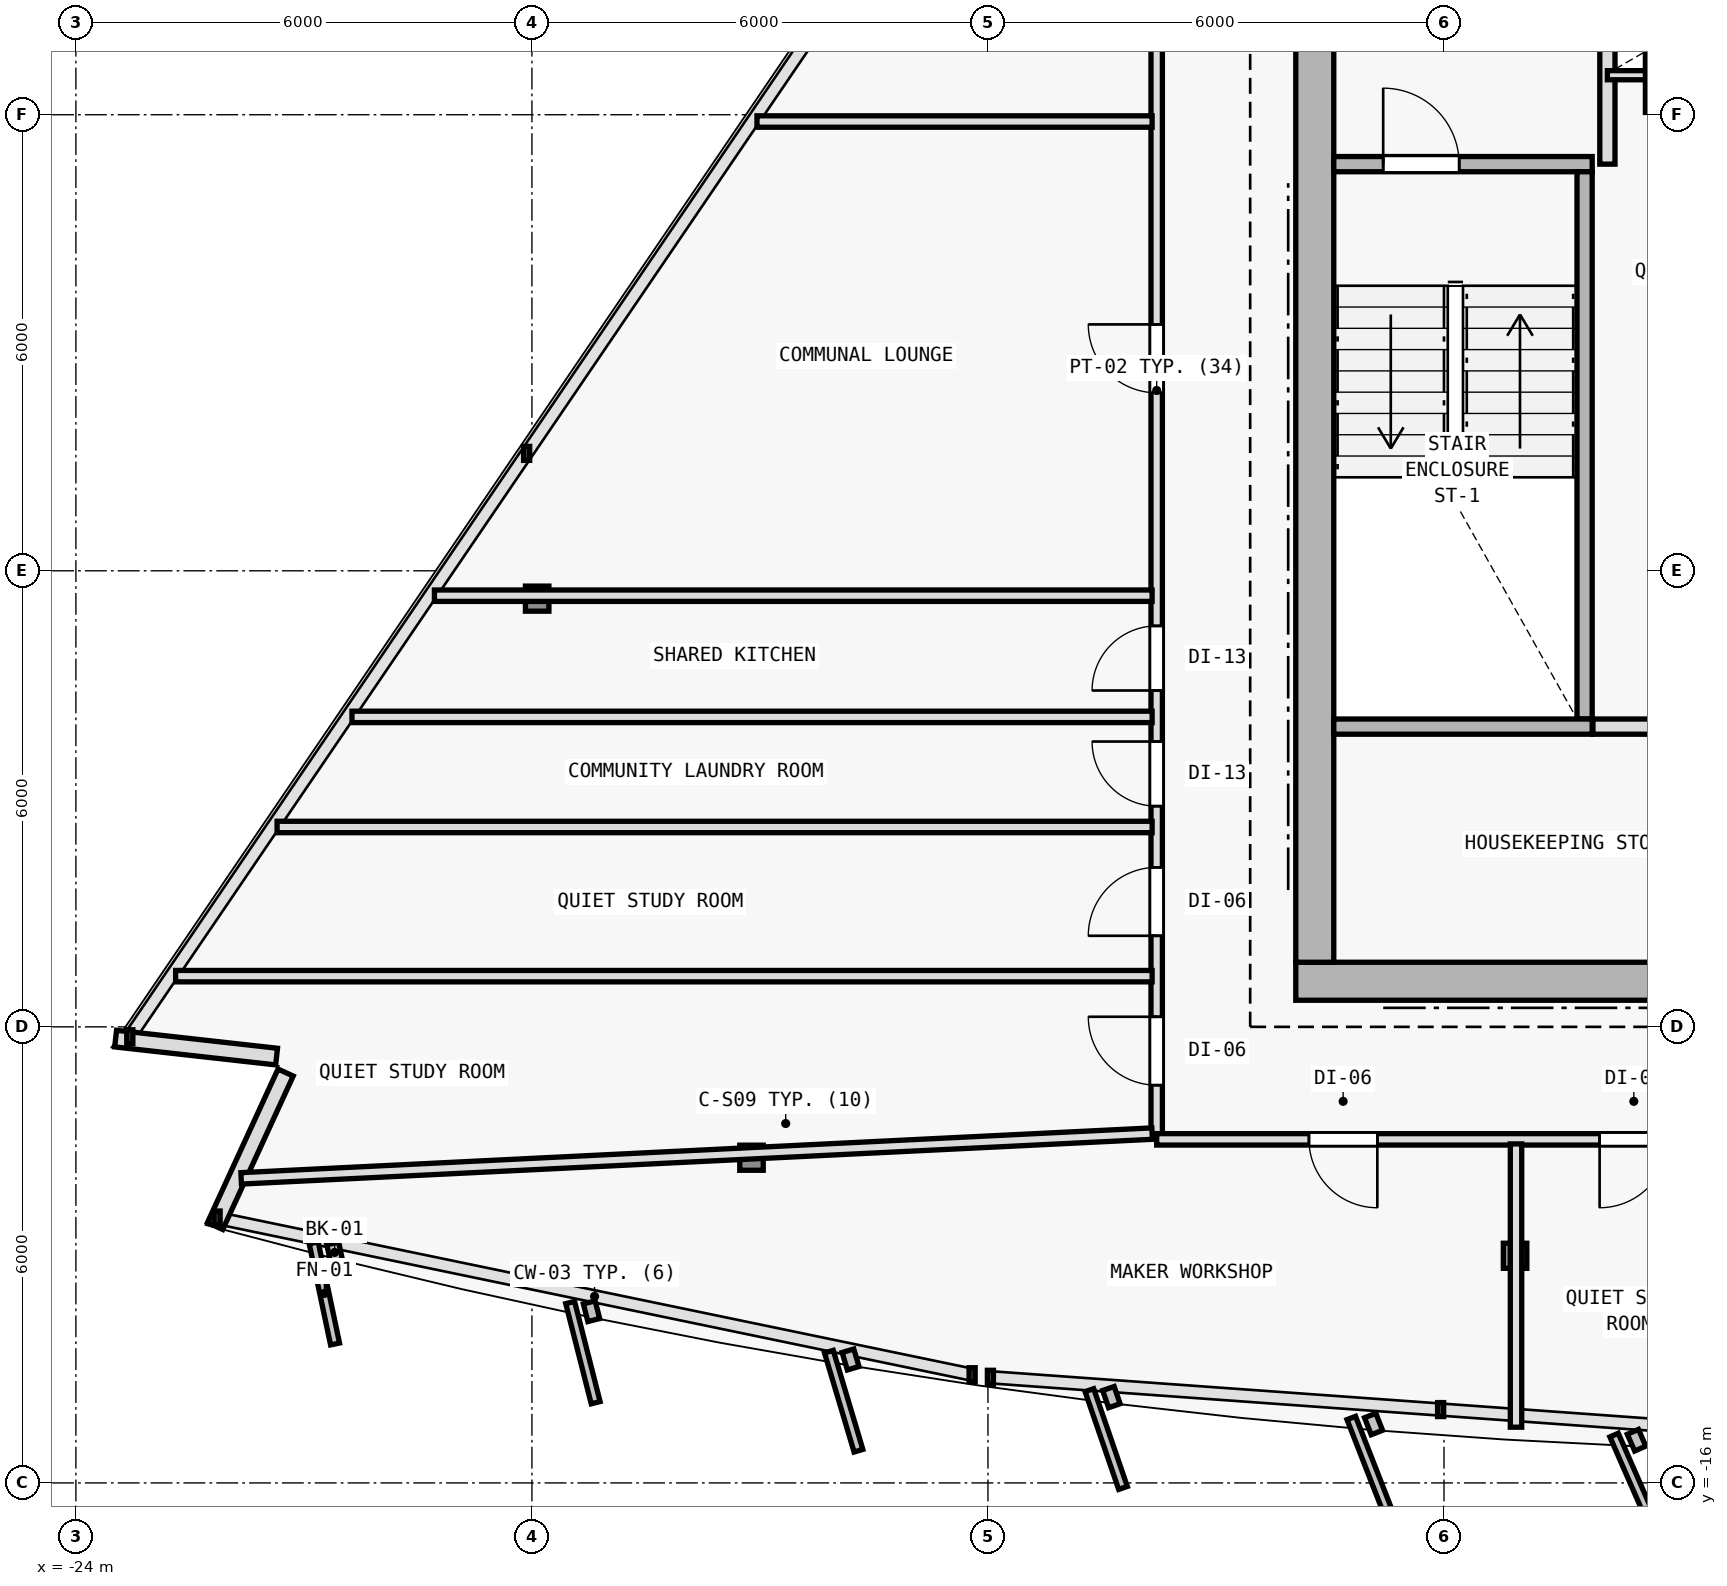
"""IFC4 building model, lengths in metres.
Left out: names, types, materials, properties, quantities, classifications, styles, units other than length and angle.
Written with IfcOpenShell. Run it as: python <this file> out.ifc"""

import sys

from ifc_helpers import new_model, si_unit, direction, frame, frame_2d, origin, origin_2d, place, context, subcontext, project, spatial, rectangle, i_section, extrude, element, fill, save


model = new_model("IFC4")
c1 = context("Model", 3, precision=1e-05, world=origin(), true_north=direction((0.0, 1.0)))
c2 = subcontext(c1, "Body", "Model", "MODEL_VIEW")
j1 = project(units=[si_unit("LENGTHUNIT", "METRE"), si_unit("PLANEANGLEUNIT", "RADIAN")], contexts=[c1])
p1 = place(None, origin())
s1 = spatial("IfcSite", under=j1, at=p1, CompositionType="ELEMENT")
p2 = place(p1, origin())
s2 = spatial("IfcBuilding", under=s1, at=p2, CompositionType="ELEMENT")
p3 = place(p2, frame((0.0, 0.0, 290.4)))
s3 = spatial("IfcBuildingStorey", under=s2, at=p3, CompositionType="ELEMENT", Elevation=290.4)
for number, where, z_axis, x_axis in (
    (1, (-7.7, -9.4, 0.0), (0.0, 0.0, 1.0), (1.0, 0.0, 0.0)),
    (2, (-7.7, 2.0, 0.0), (0.0, 0.0, 1.0), (1.0, 0.0, 0.0)),
):
    element("IfcColumn", number, at=place(p3, frame(where, z_axis=z_axis, x_axis=x_axis)), inside=s3, PredefinedType="COLUMN", context=c2, shape_type="SweptSolid", body=[
        extrude(i_section(OverallWidth=0.374, OverallDepth=0.372, WebThickness=0.012, FlangeThickness=0.02, FilletRadius=0.015, at=origin_2d()), origin(), (0.0, 0.0, 1.0), 3.6),
    ])
p4 = place(p3, frame((-15.111, -11.722, 0.006), z_axis=(0.020596339702, 0.033443561496, 0.99922836178), x_axis=(-0.851480003019, 0.52438707503, 0.0)))
e3 = element("IfcColumn", 3, at=p4, inside=s3, PredefinedType="COLUMN", context=c2, shape_type="SweptSolid", body=[
    extrude(i_section(OverallWidth=0.309, OverallDepth=0.33, WebThickness=0.011, FlangeThickness=0.019, FilletRadius=0.027, at=origin_2d()), origin(), (0.0, 0.0, 1.0), 3.592),
])
p5 = place(p3, frame((-5.065, -13.012, 0.006), z_axis=(0.006934288159, 0.035283289748, 0.999353293441), x_axis=(-0.981229659911, 0.192842823335, 0.0)))
e4 = element("IfcColumn", 4, at=p5, inside=s3, PredefinedType="COLUMN", context=c2, shape_type="SweptSolid", body=[
    extrude(i_section(OverallWidth=0.309, OverallDepth=0.33, WebThickness=0.011, FlangeThickness=0.019, FilletRadius=0.027, at=origin_2d()), origin(), (0.0, 0.0, 1.0), 3.591),
])
p6 = place(p3, frame((-17.931, -4.366, 0.006), z_axis=(0.025224163578, 0.021620711639, 0.999447990843), x_axis=(-0.650791373456, 0.759256602365, 0.0)))
e5 = element("IfcColumn", 5, at=p6, inside=s3, PredefinedType="COLUMN", context=c2, shape_type="SweptSolid", body=[
    extrude(i_section(OverallWidth=0.309, OverallDepth=0.33, WebThickness=0.011, FlangeThickness=0.019, FilletRadius=0.027, at=origin_2d()), origin(), (0.0, 0.0, 1.0), 3.591),
])
p7 = place(p3, frame((-21.36, -10.391, 0.0), z_axis=(0.0, 0.0, 1.0), x_axis=(-0.993817888275, 0.111022542511, 0.0)))
e6 = element("IfcWall", 6, at=p7, inside=s3, PredefinedType="SOLIDWALL", context=c2, shape_type="SweptSolid", body=[
    extrude(rectangle(XDim=2.131, YDim=0.22, at=frame_2d((1.065, 0.0))), origin(), (0.0, 0.0, 1.0), 3.15),
])
p8 = place(p3, frame((-22.168, -12.62, 0.0), z_axis=(0.0, 0.0, 1.0), x_axis=(0.417426589535, 0.908710648308, 0.0)))
e7 = element("IfcWall", 7, at=p8, inside=s3, PredefinedType="SOLIDWALL", context=c2, shape_type="SweptSolid", body=[
    extrude(rectangle(XDim=2.221, YDim=0.22, at=frame_2d((1.111, 0.0))), origin(), (0.0, 0.0, 1.0), 3.15),
])
p9 = place(p3, frame((-7.95, -9.4, 0.0), z_axis=(0.0, 0.0, 1.0), x_axis=(1.0, 0.0, 0.0)))
e8 = element("IfcWall", 8, at=p9, inside=s3, PredefinedType="SHEAR", context=c2, shape_type="SweptSolid", body=[
    extrude(rectangle(XDim=15.9, YDim=0.5, at=frame_2d((7.95, 0.0))), origin(), (0.0, 0.0, 1.0), 3.15),
])
p10 = place(p9, frame((9.6, 0.0, 0.0)))
e9 = element("IfcOpeningElement", 9, at=p10, cuts=e8, PredefinedType="OPENING", context=c2, shape_type="SweptSolid", body=[
    extrude(rectangle(XDim=1.5, YDim=2.2, at=frame_2d((0.75, 1.1))), frame((0.0, 0.26, 0.0), z_axis=(0.0, -1.0, 0.0), x_axis=(1.0, 0.0, 0.0)), (0.0, 0.0, 1.0), 0.52),
])
p11 = place(p3, frame((-7.7, -9.15, 0.0), z_axis=(0.0, 0.0, 1.0), x_axis=(0.0, 1.0, 0.0)))
e10 = element("IfcWall", 10, at=p11, inside=s3, PredefinedType="SHEAR", context=c2, shape_type="SweptSolid", body=[
    extrude(rectangle(XDim=19.1, YDim=0.5, at=frame_2d((9.55, 0.0))), origin(), (0.0, 0.0, 1.0), 3.15),
])
p12 = place(p11, frame((12.7, 0.0, 0.0)))
e11 = element("IfcOpeningElement", 11, at=p12, cuts=e10, PredefinedType="OPENING", context=c2, shape_type="SweptSolid", body=[
    extrude(rectangle(XDim=1.1, YDim=2.15, at=frame_2d((0.55, 1.075))), frame((0.0, 0.26, 0.0), z_axis=(0.0, -1.0, 0.0), x_axis=(1.0, 0.0, 0.0)), (0.0, 0.0, 1.0), 0.52),
])
p13 = place(p3, frame((-7.45, 1.35, 0.0), z_axis=(0.0, 0.0, 1.0), x_axis=(1.0, 0.0, 0.0)))
e12 = element("IfcWall", 12, at=p13, inside=s3, PredefinedType="SOLIDWALL", context=c2, shape_type="SweptSolid", body=[
    extrude(rectangle(XDim=3.4, YDim=0.2, at=frame_2d((1.7, 0.0))), origin(), (0.0, 0.0, 1.0), 3.15),
])
p14 = place(p13, frame((0.65, 0.0, 0.0)))
e13 = element("IfcOpeningElement", 13, at=p14, cuts=e12, PredefinedType="OPENING", context=c2, shape_type="SweptSolid", body=[
    extrude(rectangle(XDim=1.0, YDim=2.15, at=frame_2d((0.5, 1.075))), frame((0.0, 0.11, 0.0), z_axis=(0.0, -1.0, 0.0), x_axis=(1.0, 0.0, 0.0)), (0.0, 0.0, 1.0), 0.22),
])
p15 = place(p3, frame((-4.15, -5.95, 0.0), z_axis=(0.0, 0.0, 1.0), x_axis=(0.0, 1.0, 0.0)))
e14 = element("IfcWall", 14, at=p15, inside=s3, PredefinedType="SOLIDWALL", context=c2, shape_type="SweptSolid", body=[
    extrude(rectangle(XDim=7.2, YDim=0.2, at=frame_2d((3.6, 0.0))), origin(), (0.0, 0.0, 1.0), 3.15),
])
p16 = place(p3, frame((-3.85, 1.35, 0.0), z_axis=(0.0, 0.0, 1.0), x_axis=(0.0, 1.0, 0.0)))
e15 = element("IfcWall", 15, at=p16, inside=s3, PredefinedType="SOLIDWALL", context=c2, shape_type="SweptSolid", body=[
    extrude(rectangle(XDim=8.595, YDim=0.2, at=frame_2d((4.297, 0.0))), origin(), (0.0, 0.0, 1.0), 3.15),
])
p17 = place(p16, frame((1.5, 0.0, 0.0)))
e16 = element("IfcOpeningElement", 16, at=p17, cuts=e15, PredefinedType="OPENING", context=c2, shape_type="SweptSolid", body=[
    extrude(rectangle(XDim=1.0, YDim=2.15, at=frame_2d((0.5, 1.075))), frame((0.0, 0.11, 0.0), z_axis=(0.0, -1.0, 0.0), x_axis=(1.0, 0.0, 0.0)), (0.0, 0.0, 1.0), 0.22),
])
p18 = place(p16, frame((3.18, 0.0, 0.0)))
e17 = element("IfcOpeningElement", 17, at=p18, cuts=e15, PredefinedType="OPENING", context=c2, shape_type="SweptSolid", body=[
    extrude(rectangle(XDim=1.0, YDim=2.15, at=frame_2d((0.5, 1.075))), frame((0.0, 0.11, 0.0), z_axis=(0.0, -1.0, 0.0), x_axis=(1.0, 0.0, 0.0)), (0.0, 0.0, 1.0), 0.22),
])
p19 = place(p3, frame((-3.85, 2.52, 0.0), z_axis=(0.0, 0.0, 1.0), x_axis=(1.0, 0.0, 0.0)))
e18 = element("IfcWall", 18, at=p19, inside=s3, PredefinedType="PARTITIONING", context=c2, shape_type="SweptSolid", body=[
    extrude(rectangle(XDim=2.9, YDim=0.12, at=frame_2d((1.45, 0.0))), origin(), (0.0, 0.0, 1.0), 3.15),
])
p20 = place(p3, frame((-7.45, -6.05, 0.0), z_axis=(0.0, 0.0, 1.0), x_axis=(1.0, 0.0, 0.0)))
e19 = element("IfcWall", 19, at=p20, inside=s3, PredefinedType="SOLIDWALL", context=c2, shape_type="SweptSolid", body=[
    extrude(rectangle(XDim=3.4, YDim=0.2, at=frame_2d((1.7, 0.0))), origin(), (0.0, 0.0, 1.0), 3.15),
])
p21 = place(p3, frame((-4.04, -6.05, 0.0), z_axis=(0.0, 0.0, 1.0), x_axis=(1.0, 0.0, 0.0)))
e20 = element("IfcWall", 20, at=p21, inside=s3, PredefinedType="SOLIDWALL", context=c2, shape_type="SweptSolid", body=[
    extrude(rectangle(XDim=2.79, YDim=0.2, at=frame_2d((1.395, 0.0))), origin(), (0.0, 0.0, 1.0), 3.15),
])
p22 = place(p3, frame((-9.78, -11.48, 0.0), z_axis=(0.0, 0.0, 1.0), x_axis=(0.0, 1.0, 0.0)))
e21 = element("IfcWall", 21, at=p22, inside=s3, PredefinedType="PARTITIONING", context=c2, shape_type="SweptSolid", body=[
    extrude(rectangle(XDim=19.706, YDim=0.15, at=frame_2d((9.853, 0.0))), origin(), (0.0, 0.0, 1.0), 2.675),
])
p23 = place(p22, frame((9.822, 0.0, 0.0)))
e22 = element("IfcOpeningElement", 22, at=p23, cuts=e21, PredefinedType="OPENING", context=c2, shape_type="SweptSolid", body=[
    extrude(rectangle(XDim=0.9, YDim=2.1, at=frame_2d((0.45, 1.05))), frame((0.0, 0.085, 0.0), z_axis=(0.0, -1.0, 0.0), x_axis=(1.0, 0.0, 0.0)), (0.0, 0.0, 1.0), 0.17),
])
p24 = place(p22, frame((5.905, 0.0, 0.0)))
e23 = element("IfcOpeningElement", 23, at=p24, cuts=e21, PredefinedType="OPENING", context=c2, shape_type="SweptSolid", body=[
    extrude(rectangle(XDim=0.85, YDim=2.1, at=frame_2d((0.425, 1.05))), frame((0.0, 0.085, 0.0), z_axis=(0.0, -1.0, 0.0), x_axis=(1.0, 0.0, 0.0)), (0.0, 0.0, 1.0), 0.17),
])
p25 = place(p22, frame((4.384, 0.0, 0.0)))
e24 = element("IfcOpeningElement", 24, at=p25, cuts=e21, PredefinedType="OPENING", context=c2, shape_type="SweptSolid", body=[
    extrude(rectangle(XDim=0.85, YDim=2.1, at=frame_2d((0.425, 1.05))), frame((0.0, 0.085, 0.0), z_axis=(0.0, -1.0, 0.0), x_axis=(1.0, 0.0, 0.0)), (0.0, 0.0, 1.0), 0.17),
])
p26 = place(p22, frame((2.678, 0.0, 0.0)))
e25 = element("IfcOpeningElement", 25, at=p26, cuts=e21, PredefinedType="OPENING", context=c2, shape_type="SweptSolid", body=[
    extrude(rectangle(XDim=0.9, YDim=2.1, at=frame_2d((0.45, 1.05))), frame((0.0, 0.085, 0.0), z_axis=(0.0, -1.0, 0.0), x_axis=(1.0, 0.0, 0.0)), (0.0, 0.0, 1.0), 0.17),
])
p27 = place(p22, frame((0.713, 0.0, 0.0)))
e26 = element("IfcOpeningElement", 26, at=p27, cuts=e21, PredefinedType="OPENING", context=c2, shape_type="SweptSolid", body=[
    extrude(rectangle(XDim=0.9, YDim=2.1, at=frame_2d((0.45, 1.05))), frame((0.0, 0.085, 0.0), z_axis=(0.0, -1.0, 0.0), x_axis=(1.0, 0.0, 0.0)), (0.0, 0.0, 1.0), 0.17),
])
p28 = place(p22, frame((16.009, 0.0, 0.0)))
e27 = element("IfcOpeningElement", 27, at=p28, cuts=e21, PredefinedType="OPENING", context=c2, shape_type="SweptSolid", body=[
    extrude(rectangle(XDim=0.9, YDim=2.1, at=frame_2d((0.45, 1.05))), frame((0.0, 0.085, 0.0), z_axis=(0.0, -1.0, 0.0), x_axis=(1.0, 0.0, 0.0)), (0.0, 0.0, 1.0), 0.17),
])
p29 = place(p3, frame((9.78, -11.48, 0.0), z_axis=(0.0, 0.0, 1.0), x_axis=(-1.0, 0.0, 0.0)))
e28 = element("IfcWall", 28, at=p29, inside=s3, PredefinedType="PARTITIONING", context=c2, shape_type="SweptSolid", body=[
    extrude(rectangle(XDim=19.56, YDim=0.15, at=frame_2d((9.78, 0.0))), origin(), (0.0, 0.0, 1.0), 2.525),
])
p30 = place(p29, frame((16.657, 0.0, 0.0)))
e29 = element("IfcOpeningElement", 29, at=p30, cuts=e28, PredefinedType="OPENING", context=c2, shape_type="SweptSolid", body=[
    extrude(rectangle(XDim=0.9, YDim=2.1, at=frame_2d((0.45, 1.05))), frame((0.0, 0.085, 0.0), z_axis=(0.0, -1.0, 0.0), x_axis=(1.0, 0.0, 0.0)), (0.0, 0.0, 1.0), 0.17),
])
p31 = place(p29, frame((12.832, 0.0, 0.0)))
e30 = element("IfcOpeningElement", 30, at=p31, cuts=e28, PredefinedType="OPENING", context=c2, shape_type="SweptSolid", body=[
    extrude(rectangle(XDim=0.9, YDim=2.1, at=frame_2d((0.45, 1.05))), frame((0.0, 0.085, 0.0), z_axis=(0.0, -1.0, 0.0), x_axis=(1.0, 0.0, 0.0)), (0.0, 0.0, 1.0), 0.17),
])
p32 = place(p29, frame((10.225, 0.0, 0.0)))
e31 = element("IfcOpeningElement", 31, at=p32, cuts=e28, PredefinedType="OPENING", context=c2, shape_type="SweptSolid", body=[
    extrude(rectangle(XDim=0.9, YDim=2.1, at=frame_2d((0.45, 1.05))), frame((0.0, 0.085, 0.0), z_axis=(0.0, -1.0, 0.0), x_axis=(1.0, 0.0, 0.0)), (0.0, 0.0, 1.0), 0.17),
])
p33 = place(p29, frame((7.864, 0.0, 0.0)))
e32 = element("IfcOpeningElement", 32, at=p33, cuts=e28, PredefinedType="OPENING", context=c2, shape_type="SweptSolid", body=[
    extrude(rectangle(XDim=0.9, YDim=2.1, at=frame_2d((0.45, 1.05))), frame((0.0, 0.085, 0.0), z_axis=(0.0, -1.0, 0.0), x_axis=(1.0, 0.0, 0.0)), (0.0, 0.0, 1.0), 0.17),
])
p34 = place(p29, frame((5.419, 0.0, 0.0)))
e33 = element("IfcOpeningElement", 33, at=p34, cuts=e28, PredefinedType="OPENING", context=c2, shape_type="SweptSolid", body=[
    extrude(rectangle(XDim=0.9, YDim=2.1, at=frame_2d((0.45, 1.05))), frame((0.0, 0.085, 0.0), z_axis=(0.0, -1.0, 0.0), x_axis=(1.0, 0.0, 0.0)), (0.0, 0.0, 1.0), 0.17),
])
p35 = place(p3, frame((-9.84, -11.404, 0.0), z_axis=(0.0, 0.0, 1.0), x_axis=(-0.99879424389, -0.049092345355, 0.0)))
e34 = element("IfcWall", 34, at=p35, inside=s3, PredefinedType="PARTITIONING", context=c2, shape_type="SweptSolid", body=[
    extrude(rectangle(XDim=12.0, YDim=0.15, at=frame_2d((6.0, 0.0))), origin(), (0.0, 0.0, 1.0), 2.815),
])
p36 = place(p3, frame((-5.052, -11.54, 0.0), z_axis=(0.0, 0.0, 1.0), x_axis=(0.0, -1.0, 0.0)))
e35 = element("IfcWall", 35, at=p36, inside=s3, PredefinedType="PARTITIONING", context=c2, shape_type="SweptSolid", body=[
    extrude(rectangle(XDim=3.727, YDim=0.15, at=frame_2d((1.863, 0.0))), origin(), (0.0, 0.0, 1.0), 2.795),
])
p37 = place(p3, frame((-9.84, -4.328, 0.0), z_axis=(0.0, 0.0, 1.0), x_axis=(-1.0, 0.0, 0.0)))
e36 = element("IfcWall", 36, at=p37, inside=s3, PredefinedType="PARTITIONING", context=c2, shape_type="SweptSolid", body=[
    extrude(rectangle(XDim=9.443, YDim=0.15, at=frame_2d((4.721, 0.0))), origin(), (0.0, 0.0, 1.0), 2.675),
])
p38 = place(p3, frame((-9.84, -7.371, 0.0), z_axis=(0.0, 0.0, 1.0), x_axis=(-1.0, 0.0, 0.0)))
e37 = element("IfcWall", 37, at=p38, inside=s3, PredefinedType="PARTITIONING", context=c2, shape_type="SweptSolid", body=[
    extrude(rectangle(XDim=11.513, YDim=0.15, at=frame_2d((5.756, 0.0))), origin(), (0.0, 0.0, 1.0), 2.675),
])
p39 = place(p3, frame((-9.84, -5.922, 0.0), z_axis=(0.0, 0.0, 1.0), x_axis=(-1.0, 0.0, 0.0)))
e38 = element("IfcWall", 38, at=p39, inside=s3, PredefinedType="PARTITIONING", context=c2, shape_type="SweptSolid", body=[
    extrude(rectangle(XDim=10.528, YDim=0.15, at=frame_2d((5.264, 0.0))), origin(), (0.0, 0.0, 1.0), 2.675),
])
p40 = place(p3, frame((-9.84, -9.333, 0.0), z_axis=(0.0, 0.0, 1.0), x_axis=(-1.0, 0.0, 0.0)))
e39 = element("IfcWall", 39, at=p40, inside=s3, PredefinedType="PARTITIONING", context=c2, shape_type="SweptSolid", body=[
    extrude(rectangle(XDim=12.848, YDim=0.15, at=frame_2d((6.424, 0.0))), origin(), (0.0, 0.0, 1.0), 2.815),
])
p41 = place(p3, frame((-9.84, 1.911, 0.0), z_axis=(0.0, 0.0, 1.0), x_axis=(-1.0, 0.0, 0.0)))
e40 = element("IfcWall", 40, at=p41, inside=s3, PredefinedType="PARTITIONING", context=c2, shape_type="SweptSolid", body=[
    extrude(rectangle(XDim=5.199, YDim=0.15, at=frame_2d((2.6, 0.0))), origin(), (0.0, 0.0, 1.0), 2.795),
])
p42 = place(p14, origin())
e41 = element("IfcDoor", 41, at=p42, inside=s3, OperationType="SINGLE_SWING_LEFT", PredefinedType="DOOR", context=c2, shape_type="SweptSolid", body=[
    extrude(rectangle(XDim=1.0, YDim=2.15, at=frame_2d((0.5, 1.075))), frame((0.0, 0.025, 0.0), z_axis=(0.0, -1.0, 0.0), x_axis=(1.0, 0.0, 0.0)), (0.0, 0.0, 1.0), 0.05),
])
fill(e13, e41)
p43 = place(p23, origin())
e42 = element("IfcDoor", 42, at=p43, inside=s3, OperationType="SINGLE_SWING_RIGHT", PredefinedType="DOOR", context=c2, shape_type="SweptSolid", body=[
    extrude(rectangle(XDim=0.9, YDim=2.1, at=frame_2d((0.45, 1.05))), frame((0.0, 0.025, 0.0), z_axis=(0.0, -1.0, 0.0), x_axis=(1.0, 0.0, 0.0)), (0.0, 0.0, 1.0), 0.05),
])
fill(e22, e42)
p44 = place(p24, origin())
e43 = element("IfcDoor", 43, at=p44, inside=s3, OperationType="SINGLE_SWING_LEFT", PredefinedType="DOOR", context=c2, shape_type="SweptSolid", body=[
    extrude(rectangle(XDim=0.85, YDim=2.1, at=frame_2d((0.425, 1.05))), frame((0.0, 0.025, 0.0), z_axis=(0.0, -1.0, 0.0), x_axis=(1.0, 0.0, 0.0)), (0.0, 0.0, 1.0), 0.05),
])
fill(e23, e43)
p45 = place(p25, origin())
e44 = element("IfcDoor", 44, at=p45, inside=s3, OperationType="SINGLE_SWING_RIGHT", PredefinedType="DOOR", context=c2, shape_type="SweptSolid", body=[
    extrude(rectangle(XDim=0.85, YDim=2.1, at=frame_2d((0.425, 1.05))), frame((0.0, 0.025, 0.0), z_axis=(0.0, -1.0, 0.0), x_axis=(1.0, 0.0, 0.0)), (0.0, 0.0, 1.0), 0.05),
])
fill(e24, e44)
p46 = place(p26, origin())
e45 = element("IfcDoor", 45, at=p46, inside=s3, OperationType="SINGLE_SWING_LEFT", PredefinedType="DOOR", context=c2, shape_type="SweptSolid", body=[
    extrude(rectangle(XDim=0.9, YDim=2.1, at=frame_2d((0.45, 1.05))), frame((0.0, 0.025, 0.0), z_axis=(0.0, -1.0, 0.0), x_axis=(1.0, 0.0, 0.0)), (0.0, 0.0, 1.0), 0.05),
])
fill(e25, e45)
p47 = place(p27, origin())
e46 = element("IfcDoor", 46, at=p47, inside=s3, OperationType="SINGLE_SWING_RIGHT", PredefinedType="DOOR", context=c2, shape_type="SweptSolid", body=[
    extrude(rectangle(XDim=0.9, YDim=2.1, at=frame_2d((0.45, 1.05))), frame((0.0, 0.025, 0.0), z_axis=(0.0, -1.0, 0.0), x_axis=(1.0, 0.0, 0.0)), (0.0, 0.0, 1.0), 0.05),
])
fill(e26, e46)
p48 = place(p30, origin())
e47 = element("IfcDoor", 47, at=p48, inside=s3, OperationType="SINGLE_SWING_LEFT", PredefinedType="DOOR", context=c2, shape_type="SweptSolid", body=[
    extrude(rectangle(XDim=0.9, YDim=2.1, at=frame_2d((0.45, 1.05))), frame((0.0, 0.025, 0.0), z_axis=(0.0, -1.0, 0.0), x_axis=(1.0, 0.0, 0.0)), (0.0, 0.0, 1.0), 0.05),
])
fill(e29, e47)
p49 = place(p31, origin())
e48 = element("IfcDoor", 48, at=p49, inside=s3, OperationType="SINGLE_SWING_RIGHT", PredefinedType="DOOR", context=c2, shape_type="SweptSolid", body=[
    extrude(rectangle(XDim=0.9, YDim=2.1, at=frame_2d((0.45, 1.05))), frame((0.0, 0.025, 0.0), z_axis=(0.0, -1.0, 0.0), x_axis=(1.0, 0.0, 0.0)), (0.0, 0.0, 1.0), 0.05),
])
fill(e30, e48)
save(model, sys.argv[1])
